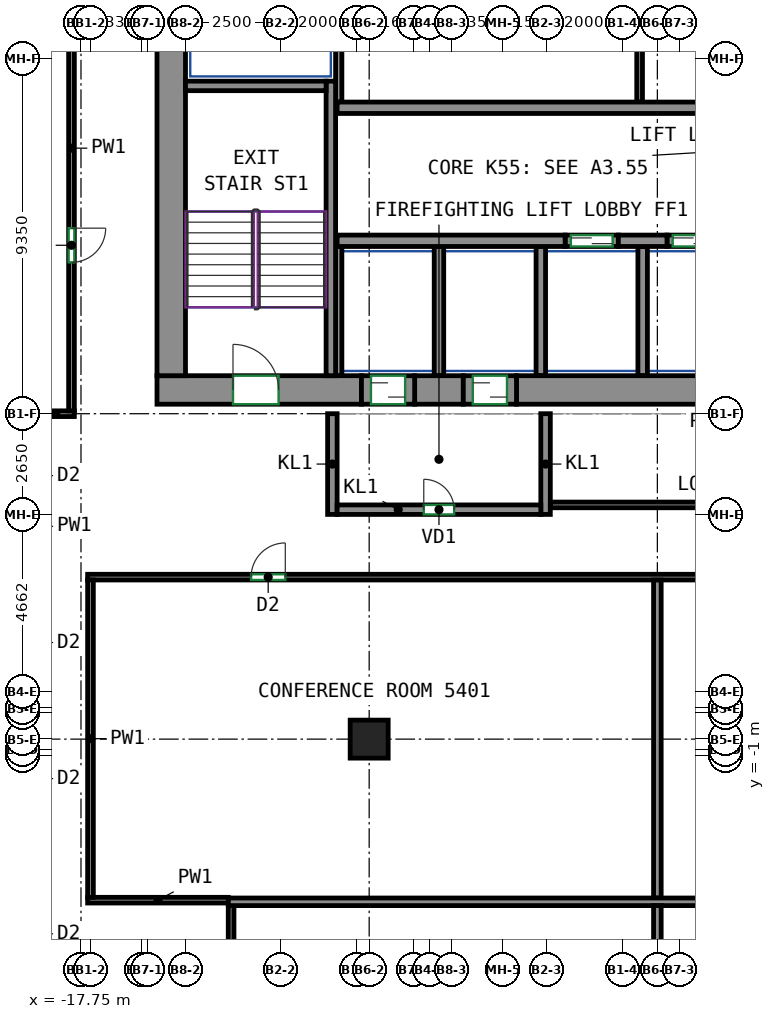
"""IFC4 building model, lengths in metres.
Left out: names, types, materials, properties, quantities, classifications, styles, units other than length and angle.
Written with IfcOpenShell. Run it as: python <this file> out.ifc"""

import sys

from ifc_helpers import new_model, si_unit, direction, frame, frame_2d, origin, origin_2d, place, context, subcontext, project, spatial, rectangle, extrude, source, transform, mapped, element, fill, save


model = new_model("IFC4")
c1 = context("Model", 3, precision=1e-05, world=origin(), true_north=direction((0.0, 1.0)))
c2 = subcontext(c1, "Body", "Model", "MODEL_VIEW")
j1 = project(units=[si_unit("LENGTHUNIT", "METRE"), si_unit("PLANEANGLEUNIT", "RADIAN")], contexts=[c1])
p1 = place(None, origin())
s1 = spatial("IfcSite", under=j1, at=p1, CompositionType="ELEMENT")
p2 = place(p1, origin())
s2 = spatial("IfcBuilding", under=s1, at=p2, CompositionType="ELEMENT")
p3 = place(p2, frame((0.0, 0.0, 220.3)))
s3 = spatial("IfcBuildingStorey", under=s2, at=p3, CompositionType="ELEMENT", Elevation=220.3)
m1 = source(origin(), c2, "Body", "SweptSolid", [
    extrude(rectangle(XDim=1.0, YDim=1.0, at=origin_2d()), origin(), (0.0, 0.0, 1.0), 3.0),
])
p4 = place(p3, frame((-10.167, -0.562, 0.0), z_axis=(0.0, 0.0, 1.0), x_axis=(1.0, 0.0, 0.0)))
e1 = element("IfcColumn", 1, at=p4, inside=s3, PredefinedType="COLUMN", context=c2, shape_type="MappedRepresentation", body=[
    mapped(m1, transform((0.0, 0.0, 0.0))),
])
m2 = source(origin(), c2, "Body", "SweptSolid", [
    extrude(rectangle(XDim=5.38, YDim=0.75, at=frame_2d((2.69, 0.0))), origin(), (0.0, 0.0, 1.0), 3.0),
])
p5 = place(p3, frame((-15.75, 8.625, 0.0), z_axis=(0.0, 0.0, 1.0), x_axis=(1.0, 0.0, 0.0)))
e2 = element("IfcWall", 2, at=p5, inside=s3, PredefinedType="SHEAR", context=c2, shape_type="MappedRepresentation", body=[
    mapped(m2, transform((0.0, 0.0, 0.0))),
])
p6 = place(p5, frame((2.0, 0.0, 0.0)))
e3 = element("IfcOpeningElement", 3, at=p6, cuts=e2, PredefinedType="OPENING", context=c2, shape_type="SweptSolid", body=[
    extrude(rectangle(XDim=1.2, YDim=2.1, at=frame_2d((0.6, 1.05))), frame((0.0, 0.385, 0.0), z_axis=(0.0, -1.0, 0.0), x_axis=(1.0, 0.0, 0.0)), (0.0, 0.0, 1.0), 0.77),
])
m3 = source(origin(), c2, "Body", "SweptSolid", [
    extrude(rectangle(XDim=1.28, YDim=0.75, at=frame_2d((0.64, 0.0))), origin(), (0.0, 0.0, 1.0), 3.0),
])
p7 = place(p3, frame((-8.97, 8.625, 0.0), z_axis=(0.0, 0.0, 1.0), x_axis=(1.0, 0.0, 0.0)))
e4 = element("IfcWall", 4, at=p7, inside=s3, PredefinedType="SHEAR", context=c2, shape_type="MappedRepresentation", body=[
    mapped(m3, transform((0.0, 0.0, 0.0))),
])
m4 = source(origin(), c2, "Body", "SweptSolid", [
    extrude(rectangle(XDim=14.18, YDim=0.75, at=frame_2d((7.09, 0.0))), origin(), (0.0, 0.0, 1.0), 3.0),
])
p8 = place(p3, frame((-6.29, 8.625, 0.0), z_axis=(0.0, 0.0, 1.0), x_axis=(1.0, 0.0, 0.0)))
e5 = element("IfcWall", 5, at=p8, inside=s3, PredefinedType="SHEAR", context=c2, shape_type="MappedRepresentation", body=[
    mapped(m4, transform((0.0, 0.0, 0.0))),
])
m5 = source(origin(), c2, "Body", "SweptSolid", [
    extrude(rectangle(XDim=12.0, YDim=0.75, at=frame_2d((6.0, 0.0))), origin(), (0.0, 0.0, 1.0), 3.0),
])
p9 = place(p3, frame((-15.375, 9.0, 0.0), z_axis=(0.0, 0.0, 1.0), x_axis=(0.0, 1.0, 0.0)))
e6 = element("IfcWall", 6, at=p9, inside=s3, PredefinedType="SHEAR", context=c2, shape_type="MappedRepresentation", body=[
    mapped(m5, transform((0.0, 0.0, 0.0))),
])
m6 = source(origin(), c2, "Body", "SweptSolid", [
    extrude(rectangle(XDim=7.75, YDim=0.25, at=frame_2d((3.875, 0.0))), origin(), (0.0, 0.0, 1.0), 3.0),
])
p10 = place(p3, frame((-11.175, 9.0, 0.0), z_axis=(0.0, 0.0, 1.0), x_axis=(0.0, 1.0, 0.0)))
e7 = element("IfcWall", 7, at=p10, inside=s3, PredefinedType="SHEAR", context=c2, shape_type="MappedRepresentation", body=[
    mapped(m6, transform((0.0, 0.0, 0.0))),
])
m7 = source(origin(), c2, "Body", "SweptSolid", [
    extrude(rectangle(XDim=3.7, YDim=0.25, at=frame_2d((1.85, 0.0))), origin(), (0.0, 0.0, 1.0), 3.0),
])
p11 = place(p3, frame((-15.0, 16.625, 0.0), z_axis=(0.0, 0.0, 1.0), x_axis=(1.0, 0.0, 0.0)))
e8 = element("IfcWall", 8, at=p11, inside=s3, PredefinedType="SHEAR", context=c2, shape_type="MappedRepresentation", body=[
    mapped(m7, transform((0.0, 0.0, 0.0))),
])
m8 = source(origin(), c2, "Body", "SweptSolid", [
    extrude(rectangle(XDim=6.0, YDim=0.3, at=frame_2d((3.0, 0.0))), origin(), (0.0, 0.0, 1.0), 3.0),
])
p12 = place(p3, frame((-11.01, 12.55, 0.0), z_axis=(0.0, 0.0, 1.0), x_axis=(1.0, 0.0, 0.0)))
e9 = element("IfcWall", 9, at=p12, inside=s3, PredefinedType="SHEAR", context=c2, shape_type="MappedRepresentation", body=[
    mapped(m8, transform((0.0, 0.0, 0.0))),
])
m9 = source(origin(), c2, "Body", "SweptSolid", [
    extrude(rectangle(XDim=1.28, YDim=0.3, at=frame_2d((0.64, 0.0))), origin(), (0.0, 0.0, 1.0), 3.0),
])
p13 = place(p3, frame((-3.61, 12.55, 0.0), z_axis=(0.0, 0.0, 1.0), x_axis=(1.0, 0.0, 0.0)))
e10 = element("IfcWall", 10, at=p13, inside=s3, PredefinedType="SHEAR", context=c2, shape_type="MappedRepresentation", body=[
    mapped(m9, transform((0.0, 0.0, 0.0))),
])
m10 = source(origin(), c2, "Body", "SweptSolid", [
    extrude(rectangle(XDim=14.04, YDim=0.3, at=frame_2d((7.02, 0.0))), origin(), (0.0, 0.0, 1.0), 3.0),
])
p14 = place(p3, frame((-11.01, 16.05, 0.0), z_axis=(0.0, 0.0, 1.0), x_axis=(1.0, 0.0, 0.0)))
e11 = element("IfcWall", 11, at=p14, inside=s3, PredefinedType="SHEAR", context=c2, shape_type="MappedRepresentation", body=[
    mapped(m10, transform((0.0, 0.0, 0.0))),
])
m11 = source(origin(), c2, "Body", "SweptSolid", [
    extrude(rectangle(XDim=1.4, YDim=0.3, at=frame_2d((0.7, 0.0))), origin(), (0.0, 0.0, 1.0), 3.0),
])
p15 = place(p3, frame((-5.01, 12.55, 0.0), z_axis=(0.0, 0.0, 1.0), x_axis=(1.0, 0.0, 0.0)))
e12 = element("IfcWall", 12, at=p15, inside=s3, PredefinedType="PARTITIONING", context=c2, shape_type="MappedRepresentation", body=[
    mapped(m11, transform((0.0, 0.0, 0.0))),
])
p16 = place(p15, frame((0.15, 0.0, 0.0)))
e13 = element("IfcOpeningElement", 13, at=p16, cuts=e12, PredefinedType="OPENING", context=c2, shape_type="SweptSolid", body=[
    extrude(rectangle(XDim=1.1, YDim=2.1, at=frame_2d((0.55, 1.05))), frame((0.0, 0.16, 0.0), z_axis=(0.0, -1.0, 0.0), x_axis=(1.0, 0.0, 0.0)), (0.0, 0.0, 1.0), 0.32),
])
m12 = source(origin(), c2, "Body", "SweptSolid", [
    extrude(rectangle(XDim=1.4, YDim=0.3, at=frame_2d((0.7, 0.0))), origin(), (0.0, 0.0, 1.0), 3.0),
])
p17 = place(p3, frame((-2.33, 12.55, 0.0), z_axis=(0.0, 0.0, 1.0), x_axis=(1.0, 0.0, 0.0)))
e14 = element("IfcWall", 14, at=p17, inside=s3, PredefinedType="PARTITIONING", context=c2, shape_type="MappedRepresentation", body=[
    mapped(m12, transform((0.0, 0.0, 0.0))),
])
p18 = place(p17, frame((0.15, 0.0, 0.0)))
e15 = element("IfcOpeningElement", 15, at=p18, cuts=e14, PredefinedType="OPENING", context=c2, shape_type="SweptSolid", body=[
    extrude(rectangle(XDim=1.1, YDim=2.1, at=frame_2d((0.55, 1.05))), frame((0.0, 0.16, 0.0), z_axis=(0.0, -1.0, 0.0), x_axis=(1.0, 0.0, 0.0)), (0.0, 0.0, 1.0), 0.32),
])
m13 = source(origin(), c2, "Body", "SweptSolid", [
    extrude(rectangle(XDim=2.65, YDim=0.25, at=frame_2d((1.325, 0.0))), origin(), (0.0, 0.0, 1.0), 3.0),
])
for number, where, z_axis, x_axis in (
    (16, (-11.135, 5.35, 0.0), (0.0, 0.0, 1.0), (0.0, 1.0, 0.0)),
    (17, (-5.525, 5.35, 0.0), (0.0, 0.0, 1.0), (0.0, 1.0, 0.0)),
):
    element("IfcWall", number, at=place(p3, frame(where, z_axis=z_axis, x_axis=x_axis)), inside=s3, PredefinedType="PARTITIONING", context=c2, shape_type="MappedRepresentation", body=[
        mapped(m13, transform((0.0, 0.0, 0.0))),
    ])
m14 = source(origin(), c2, "Body", "SweptSolid", [
    extrude(rectangle(XDim=5.36, YDim=0.25, at=frame_2d((2.68, 0.0))), origin(), (0.0, 0.0, 1.0), 3.0),
])
p19 = place(p3, frame((-11.01, 5.475, 0.0), z_axis=(0.0, 0.0, 1.0), x_axis=(1.0, 0.0, 0.0)))
e18 = element("IfcWall", 18, at=p19, inside=s3, PredefinedType="PARTITIONING", context=c2, shape_type="MappedRepresentation", body=[
    mapped(m14, transform((0.0, 0.0, 0.0))),
])
p20 = place(p19, frame((2.28, 0.0, 0.0)))
e19 = element("IfcOpeningElement", 19, at=p20, cuts=e18, PredefinedType="OPENING", context=c2, shape_type="SweptSolid", body=[
    extrude(rectangle(XDim=0.8, YDim=2.0, at=frame_2d((0.4, 1.0))), frame((0.0, 0.135, 0.0), z_axis=(0.0, -1.0, 0.0), x_axis=(1.0, 0.0, 0.0)), (0.0, 0.0, 1.0), 0.27),
])
m15 = source(origin(), c2, "Body", "SweptSolid", [
    extrude(rectangle(XDim=4.8, YDim=0.165, at=frame_2d((2.4, 0.0))), origin(), (0.0, 0.0, 1.0), 3.0),
])
p21 = place(p3, frame((-10.968, 16.2, 0.0), z_axis=(0.0, 0.0, 1.0), x_axis=(0.0, 1.0, 0.0)))
e20 = element("IfcWall", 20, at=p21, inside=s3, PredefinedType="PARTITIONING", context=c2, shape_type="MappedRepresentation", body=[
    mapped(m15, transform((0.0, 0.0, 0.0))),
])
m16 = source(origin(), c2, "Body", "SweptSolid", [
    extrude(rectangle(XDim=3.4, YDim=0.165, at=frame_2d((1.7, 0.0))), origin(), (0.0, 0.0, 1.0), 3.0),
])
p22 = place(p3, frame((-10.968, 9.0, 0.0), z_axis=(0.0, 0.0, 1.0), x_axis=(0.0, 1.0, 0.0)))
e21 = element("IfcWall", 21, at=p22, inside=s3, PredefinedType="PARTITIONING", context=c2, shape_type="MappedRepresentation", body=[
    mapped(m16, transform((0.0, 0.0, 0.0))),
])
m17 = source(origin(), c2, "Body", "SweptSolid", [
    extrude(rectangle(XDim=3.4, YDim=0.25, at=frame_2d((1.7, 0.0))), origin(), (0.0, 0.0, 1.0), 3.0),
])
for number, where, z_axis, x_axis in (
    (22, (-2.97, 9.0, 0.0), (0.0, 0.0, 1.0), (0.0, 1.0, 0.0)),
    (23, (-5.65, 9.0, 0.0), (0.0, 0.0, 1.0), (0.0, 1.0, 0.0)),
    (24, (-8.33, 9.0, 0.0), (0.0, 0.0, 1.0), (0.0, 1.0, 0.0)),
):
    element("IfcWall", number, at=place(p3, frame(where, z_axis=z_axis, x_axis=x_axis)), inside=s3, PredefinedType="PARTITIONING", context=c2, shape_type="MappedRepresentation", body=[
        mapped(m17, transform((0.0, 0.0, 0.0))),
    ])
m18 = source(origin(), c2, "Body", "SweptSolid", [
    extrude(rectangle(XDim=4.8, YDim=0.15, at=frame_2d((2.4, 0.0))), origin(), (0.0, 0.0, 1.0), 3.0),
])
p23 = place(p3, frame((-3.05, 16.2, 0.0), z_axis=(0.0, 0.0, 1.0), x_axis=(0.0, 1.0, 0.0)))
e25 = element("IfcWall", 25, at=p23, inside=s3, PredefinedType="PARTITIONING", context=c2, shape_type="MappedRepresentation", body=[
    mapped(m18, transform((0.0, 0.0, 0.0))),
])
m19 = source(origin(), c2, "Body", "SweptSolid", [
    extrude(rectangle(XDim=1.4, YDim=0.75, at=frame_2d((0.7, 0.0))), origin(), (0.0, 0.0, 1.0), 2.7),
])
p24 = place(p3, frame((-10.37, 8.625, 0.0), z_axis=(0.0, 0.0, 1.0), x_axis=(1.0, 0.0, 0.0)))
e26 = element("IfcWall", 26, at=p24, inside=s3, PredefinedType="PARTITIONING", context=c2, shape_type="MappedRepresentation", body=[
    mapped(m19, transform((0.0, 0.0, 0.0))),
])
p25 = place(p24, frame((0.25, 0.0, 0.0)))
e27 = element("IfcOpeningElement", 27, at=p25, cuts=e26, PredefinedType="OPENING", context=c2, shape_type="SweptSolid", body=[
    extrude(rectangle(XDim=0.9, YDim=2.1, at=frame_2d((0.45, 1.05))), frame((0.0, 0.385, 0.0), z_axis=(0.0, -1.0, 0.0), x_axis=(1.0, 0.0, 0.0)), (0.0, 0.0, 1.0), 0.77),
])
m20 = source(origin(), c2, "Body", "SweptSolid", [
    extrude(rectangle(XDim=1.4, YDim=0.75, at=frame_2d((0.7, 0.0))), origin(), (0.0, 0.0, 1.0), 2.7),
])
p26 = place(p3, frame((-7.69, 8.625, 0.0), z_axis=(0.0, 0.0, 1.0), x_axis=(1.0, 0.0, 0.0)))
e28 = element("IfcWall", 28, at=p26, inside=s3, PredefinedType="PARTITIONING", context=c2, shape_type="MappedRepresentation", body=[
    mapped(m20, transform((0.0, 0.0, 0.0))),
])
p27 = place(p26, frame((0.25, 0.0, 0.0)))
e29 = element("IfcOpeningElement", 29, at=p27, cuts=e28, PredefinedType="OPENING", context=c2, shape_type="SweptSolid", body=[
    extrude(rectangle(XDim=0.9, YDim=2.1, at=frame_2d((0.45, 1.05))), frame((0.0, 0.385, 0.0), z_axis=(0.0, -1.0, 0.0), x_axis=(1.0, 0.0, 0.0)), (0.0, 0.0, 1.0), 0.77),
])
p28 = place(p3, frame((-17.925, 8.0, 0.0), z_axis=(0.0, 0.0, 1.0), x_axis=(-1.0, 0.0, 0.0)))
e30 = element("IfcWall", 30, at=p28, inside=s3, PredefinedType="PARTITIONING", context=c2, shape_type="SweptSolid", body=[
    extrude(rectangle(XDim=0.976, YDim=0.15, at=frame_2d((0.488, 0.0))), origin(), (0.0, 0.0, 1.0), 3.0),
])
p29 = place(p3, frame((-18.0, 21.9, 0.0), z_axis=(0.0, 0.0, 1.0), x_axis=(0.0, -1.0, 0.0)))
e31 = element("IfcWall", 31, at=p29, inside=s3, PredefinedType="PARTITIONING", context=c2, shape_type="SweptSolid", body=[
    extrude(rectangle(XDim=13.825, YDim=0.15, at=frame_2d((6.913, 0.0))), origin(), (0.0, 0.0, 1.0), 3.0),
])
p30 = place(p29, frame((9.018, 0.0, 0.0)))
e32 = element("IfcOpeningElement", 32, at=p30, cuts=e31, PredefinedType="OPENING", context=c2, shape_type="SweptSolid", body=[
    extrude(rectangle(XDim=0.9, YDim=2.1, at=frame_2d((0.45, 1.05))), frame((0.0, 0.085, 0.0), z_axis=(0.0, -1.0, 0.0), x_axis=(1.0, 0.0, 0.0)), (0.0, 0.0, 1.0), 0.17),
])
p31 = place(p3, frame((7.875, 5.6, 0.0), z_axis=(0.0, 0.0, 1.0), x_axis=(-1.0, 0.0, 0.0)))
e33 = element("IfcWall", 33, at=p31, inside=s3, PredefinedType="PARTITIONING", context=c2, shape_type="SweptSolid", body=[
    extrude(rectangle(XDim=13.275, YDim=0.15, at=frame_2d((6.637, 0.0))), origin(), (0.0, 0.0, 1.0), 3.0),
])
p32 = place(p31, frame((2.112, 0.0, 0.0)))
e34 = element("IfcOpeningElement", 34, at=p32, cuts=e33, PredefinedType="OPENING", context=c2, shape_type="SweptSolid", body=[
    extrude(rectangle(XDim=1.0, YDim=2.1, at=frame_2d((0.5, 1.05))), frame((0.0, 0.085, 0.0), z_axis=(0.0, -1.0, 0.0), x_axis=(1.0, 0.0, 0.0)), (0.0, 0.0, 1.0), 0.17),
])
p33 = place(p3, frame((-17.575, -4.8, 0.0), z_axis=(0.0, 0.0, 1.0), x_axis=(1.0, 0.0, 0.0)))
e35 = element("IfcWall", 35, at=p33, inside=s3, PredefinedType="PARTITIONING", context=c2, shape_type="SweptSolid", body=[
    extrude(rectangle(XDim=3.702, YDim=0.15, at=frame_2d((1.851, 0.0))), origin(), (0.0, 0.0, 1.0), 3.0),
])
p34 = place(p3, frame((-17.575, 3.7, 0.0), z_axis=(0.0, 0.0, 1.0), x_axis=(1.0, 0.0, 0.0)))
e36 = element("IfcWall", 36, at=p34, inside=s3, PredefinedType="PARTITIONING", context=c2, shape_type="SweptSolid", body=[
    extrude(rectangle(XDim=33.85, YDim=0.15, at=frame_2d((16.925, 0.0))), origin(), (0.0, 0.0, 1.0), 3.0),
])
p35 = place(p34, frame((4.301, 0.0, 0.0)))
e37 = element("IfcOpeningElement", 37, at=p35, cuts=e36, PredefinedType="OPENING", context=c2, shape_type="SweptSolid", body=[
    extrude(rectangle(XDim=0.9, YDim=2.1, at=frame_2d((0.45, 1.05))), frame((0.0, 0.085, 0.0), z_axis=(0.0, -1.0, 0.0), x_axis=(1.0, 0.0, 0.0)), (0.0, 0.0, 1.0), 0.17),
])
p36 = place(p34, frame((18.816, 0.0, 0.0)))
e38 = element("IfcOpeningElement", 38, at=p36, cuts=e36, PredefinedType="OPENING", context=c2, shape_type="SweptSolid", body=[
    extrude(rectangle(XDim=0.9, YDim=2.1, at=frame_2d((0.45, 1.05))), frame((0.0, 0.085, 0.0), z_axis=(0.0, -1.0, 0.0), x_axis=(1.0, 0.0, 0.0)), (0.0, 0.0, 1.0), 0.17),
])
p37 = place(p34, frame((26.656, 0.0, 0.0)))
e39 = element("IfcOpeningElement", 39, at=p37, cuts=e36, PredefinedType="OPENING", context=c2, shape_type="SweptSolid", body=[
    extrude(rectangle(XDim=0.9, YDim=2.1, at=frame_2d((0.45, 1.05))), frame((0.0, 0.085, 0.0), z_axis=(0.0, -1.0, 0.0), x_axis=(1.0, 0.0, 0.0)), (0.0, 0.0, 1.0), 0.17),
])
p38 = place(p3, frame((-17.5, -4.725, 0.0), z_axis=(0.0, 0.0, 1.0), x_axis=(0.0, 1.0, 0.0)))
e40 = element("IfcWall", 40, at=p38, inside=s3, PredefinedType="PARTITIONING", context=c2, shape_type="SweptSolid", body=[
    extrude(rectangle(XDim=8.35, YDim=0.15, at=frame_2d((4.175, 0.0))), origin(), (0.0, 0.0, 1.0), 3.0),
])
p39 = place(p3, frame((-13.8, -7.75, 0.0), z_axis=(0.0, 0.0, 1.0), x_axis=(0.0, 1.0, 0.0)))
e41 = element("IfcWall", 41, at=p39, inside=s3, PredefinedType="PARTITIONING", context=c2, shape_type="SweptSolid", body=[
    extrude(rectangle(XDim=2.817, YDim=0.15, at=frame_2d((1.408, 0.0))), origin(), (0.0, 0.0, 1.0), 3.0),
])
p40 = place(p3, frame((-2.583, -4.743, 0.0), z_axis=(0.0, 0.0, 1.0), x_axis=(0.0, 1.0, 0.0)))
e42 = element("IfcWall", 42, at=p40, inside=s3, PredefinedType="PARTITIONING", context=c2, shape_type="SweptSolid", body=[
    extrude(rectangle(XDim=8.366, YDim=0.2, at=frame_2d((4.183, 0.0))), origin(), (0.0, 0.0, 1.0), 3.0),
])
p41 = place(p3, frame((-13.873, -4.843, 0.0), z_axis=(0.0, 0.0, 1.0), x_axis=(1.0, 0.0, 0.0)))
e43 = element("IfcWall", 43, at=p41, inside=s3, PredefinedType="PARTITIONING", context=c2, shape_type="SweptSolid", body=[
    extrude(rectangle(XDim=30.146, YDim=0.2, at=frame_2d((15.073, 0.0))), origin(), (0.0, 0.0, 1.0), 3.0),
])
p42 = place(p3, frame((-2.583, -15.423, 0.0), z_axis=(0.0, 0.0, 1.0), x_axis=(0.0, 1.0, 0.0)))
e44 = element("IfcWall", 44, at=p42, inside=s3, PredefinedType="PARTITIONING", context=c2, shape_type="SweptSolid", body=[
    extrude(rectangle(XDim=10.48, YDim=0.2, at=frame_2d((5.24, 0.0))), origin(), (0.0, 0.0, 1.0), 3.0),
])
p43 = place(p20, origin())
e45 = element("IfcDoor", 45, at=p43, inside=s3, OperationType="SINGLE_SWING_LEFT", PredefinedType="DOOR", context=c2, shape_type="SweptSolid", body=[
    extrude(rectangle(XDim=0.8, YDim=2.0, at=frame_2d((0.4, 1.0))), frame((0.0, 0.025, 0.0), z_axis=(0.0, -1.0, 0.0), x_axis=(1.0, 0.0, 0.0)), (0.0, 0.0, 1.0), 0.05),
])
fill(e19, e45)
p44 = place(p25, origin())
e46 = element("IfcDoor", 46, at=p44, inside=s3, OperationType="SLIDING_TO_LEFT", PredefinedType="DOOR", context=c2, shape_type="SweptSolid", body=[
    extrude(rectangle(XDim=0.9, YDim=2.1, at=frame_2d((0.45, 1.05))), frame((0.0, 0.28, 0.0), z_axis=(0.0, -1.0, 0.0), x_axis=(1.0, 0.0, 0.0)), (0.0, 0.0, 1.0), 0.05),
])
fill(e27, e46)
p45 = place(p27, origin())
e47 = element("IfcDoor", 47, at=p45, inside=s3, OperationType="SLIDING_TO_RIGHT", PredefinedType="DOOR", context=c2, shape_type="SweptSolid", body=[
    extrude(rectangle(XDim=0.9, YDim=2.1, at=frame_2d((0.45, 1.05))), frame((0.0, 0.28, 0.0), z_axis=(0.0, -1.0, 0.0), x_axis=(1.0, 0.0, 0.0)), (0.0, 0.0, 1.0), 0.05),
])
fill(e29, e47)
p46 = place(p16, origin())
e48 = element("IfcDoor", 48, at=p46, inside=s3, OperationType="DOUBLE_DOOR_SLIDING", PredefinedType="DOOR", context=c2, shape_type="SweptSolid", body=[
    extrude(rectangle(XDim=1.1, YDim=2.1, at=frame_2d((0.55, 1.05))), frame((0.0, 0.025, 0.0), z_axis=(0.0, -1.0, 0.0), x_axis=(1.0, 0.0, 0.0)), (0.0, 0.0, 1.0), 0.05),
])
fill(e13, e48)
p47 = place(p18, origin())
e49 = element("IfcDoor", 49, at=p47, inside=s3, OperationType="DOUBLE_DOOR_SLIDING", PredefinedType="DOOR", context=c2, shape_type="SweptSolid", body=[
    extrude(rectangle(XDim=1.1, YDim=2.1, at=frame_2d((0.55, 1.05))), frame((0.0, 0.025, 0.0), z_axis=(0.0, -1.0, 0.0), x_axis=(1.0, 0.0, 0.0)), (0.0, 0.0, 1.0), 0.05),
])
fill(e15, e49)
p48 = place(p6, origin())
e50 = element("IfcDoor", 50, at=p48, inside=s3, OperationType="DOUBLE_DOOR_SINGLE_SWING", PredefinedType="DOOR", context=c2, shape_type="SweptSolid", body=[
    extrude(rectangle(XDim=1.2, YDim=2.1, at=frame_2d((0.6, 1.05))), frame((0.0, 0.28, 0.0), z_axis=(0.0, -1.0, 0.0), x_axis=(1.0, 0.0, 0.0)), (0.0, 0.0, 1.0), 0.05),
])
fill(e3, e50)
p49 = place(p35, origin())
e51 = element("IfcDoor", 51, at=p49, inside=s3, OperationType="SINGLE_SWING_RIGHT", PredefinedType="DOOR", context=c2, shape_type="SweptSolid", body=[
    extrude(rectangle(XDim=0.9, YDim=2.1, at=frame_2d((0.45, 1.05))), frame((0.0, 0.025, 0.0), z_axis=(0.0, -1.0, 0.0), x_axis=(1.0, 0.0, 0.0)), (0.0, 0.0, 1.0), 0.05),
])
fill(e37, e51)
p50 = place(p30, origin())
e52 = element("IfcDoor", 52, at=p50, inside=s3, OperationType="SINGLE_SWING_LEFT", PredefinedType="DOOR", context=c2, shape_type="SweptSolid", body=[
    extrude(rectangle(XDim=0.9, YDim=2.1, at=frame_2d((0.45, 1.05))), frame((0.0, 0.025, 0.0), z_axis=(0.0, -1.0, 0.0), x_axis=(1.0, 0.0, 0.0)), (0.0, 0.0, 1.0), 0.05),
])
fill(e32, e52)
save(model, sys.argv[1])
